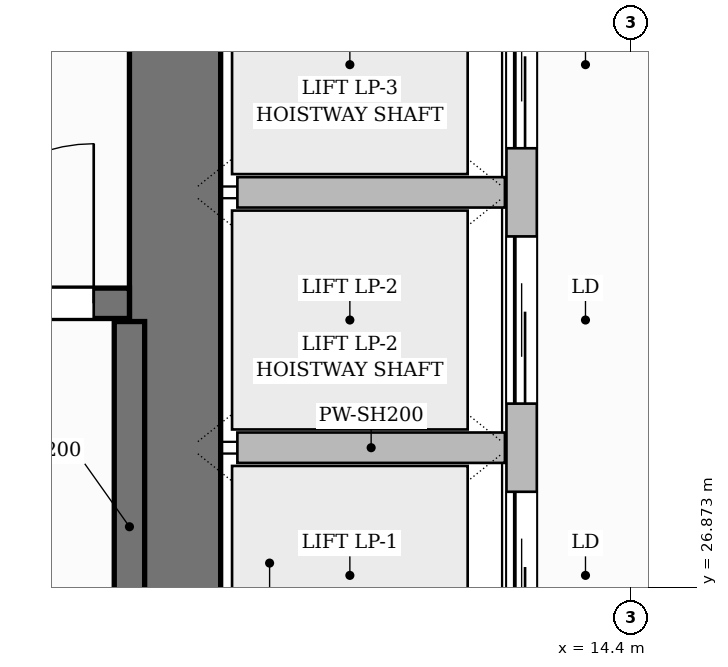
"""IFC4 building model, lengths in metres.
Left out: names, types, materials, properties, quantities, classifications, styles, units other than length and angle.
Written with IfcOpenShell. Run it as: python <this file> out.ifc"""

import sys

from ifc_helpers import new_model, si_unit, direction, frame, frame_2d, origin, place, context, subcontext, project, spatial, rectangle, extrude, source, transform, mapped, element, fill, save


model = new_model("IFC4")
c1 = context("Model", 3, precision=1e-05, world=origin(), true_north=direction((0.0, 1.0)))
c2 = subcontext(c1, "Body", "Model", "MODEL_VIEW")
j1 = project(units=[si_unit("LENGTHUNIT", "METRE"), si_unit("PLANEANGLEUNIT", "RADIAN")], contexts=[c1])
p1 = place(None, origin())
s1 = spatial("IfcSite", under=j1, at=p1, CompositionType="ELEMENT")
p2 = place(p1, origin())
s2 = spatial("IfcBuilding", under=s1, at=p2, CompositionType="ELEMENT")
p3 = place(p2, origin())
s3 = spatial("IfcBuildingStorey", under=s2, at=p3, CompositionType="ELEMENT", Elevation=0.0)
p4 = place(p3, frame((11.4, 25.5, 0.0), z_axis=(0.0, 0.0, 1.0), x_axis=(0.0, 1.0, 0.0)))
e1 = element("IfcWall", 1, at=p4, inside=s3, PredefinedType="SHEAR", context=c2, shape_type="SweptSolid", body=[
    extrude(rectangle(XDim=13.8, YDim=0.6, at=frame_2d((6.9, 0.0))), origin(), (0.0, 0.0, 1.0), 5.4),
])
p5 = place(p4, frame((6.47, 0.0, 0.0)))
e2 = element("IfcOpeningElement", 2, at=p5, cuts=e1, PredefinedType="OPENING", context=c2, shape_type="SweptSolid", body=[
    extrude(rectangle(XDim=1.5, YDim=2.2, at=frame_2d((0.75, 1.1))), frame((0.0, 0.31, 0.0), z_axis=(0.0, -1.0, 0.0), x_axis=(1.0, 0.0, 0.0)), (0.0, 0.0, 1.0), 0.62),
])
p6 = place(p3, frame((11.1, 25.92, 0.0), z_axis=(0.0, 0.0, 1.0), x_axis=(0.0, 1.0, 0.0)))
e3 = element("IfcWall", 3, at=p6, inside=s3, PredefinedType="SHEAR", context=c2, shape_type="SweptSolid", body=[
    extrude(rectangle(XDim=2.7, YDim=0.2, at=frame_2d((1.35, 0.0))), origin(), (0.0, 0.0, 1.0), 5.4),
])
p7 = place(p3, frame((4.0, 28.74, 0.0), z_axis=(0.0, 0.0, 1.0), x_axis=(1.0, 0.0, 0.0)))
e4 = element("IfcWall", 4, at=p7, inside=s3, PredefinedType="SHEAR", context=c2, shape_type="SweptSolid", body=[
    extrude(rectangle(XDim=7.1, YDim=0.2, at=frame_2d((3.55, 0.0))), origin(), (0.0, 0.0, 1.0), 5.4),
])
p8 = place(p7, frame((5.815, 0.0, 0.0)))
e5 = element("IfcOpeningElement", 5, at=p8, cuts=e4, PredefinedType="OPENING", context=c2, shape_type="SweptSolid", body=[
    extrude(rectangle(XDim=1.05, YDim=2.2, at=frame_2d((0.525, 1.1))), frame((0.0, 0.11, 0.0), z_axis=(0.0, -1.0, 0.0), x_axis=(1.0, 0.0, 0.0)), (0.0, 0.0, 1.0), 0.22),
])
p9 = place(p3, frame((13.68, 26.16, 0.0), z_axis=(0.0, 0.0, 1.0), x_axis=(0.0, 1.0, 0.0)))
e6 = element("IfcWall", 6, at=p9, inside=s3, PredefinedType="PARTITIONING", context=c2, shape_type="SweptSolid", body=[
    extrude(rectangle(XDim=4.94, YDim=0.2, at=frame_2d((2.47, 0.0))), origin(), (0.0, 0.0, 1.0), 5.1),
])
p10 = place(p9, frame((0.24, 0.0, 0.0)))
e7 = element("IfcOpeningElement", 7, at=p10, cuts=e6, PredefinedType="OPENING", context=c2, shape_type="SweptSolid", body=[
    extrude(rectangle(XDim=1.1, YDim=2.2, at=frame_2d((0.55, 1.1))), frame((0.0, 0.11, 0.0), z_axis=(0.0, -1.0, 0.0), x_axis=(1.0, 0.0, 0.0)), (0.0, 0.0, 1.0), 0.22),
])
p11 = place(p9, frame((1.92, 0.0, 0.0)))
e8 = element("IfcOpeningElement", 8, at=p11, cuts=e6, PredefinedType="OPENING", context=c2, shape_type="SweptSolid", body=[
    extrude(rectangle(XDim=1.1, YDim=2.2, at=frame_2d((0.55, 1.1))), frame((0.0, 0.11, 0.0), z_axis=(0.0, -1.0, 0.0), x_axis=(1.0, 0.0, 0.0)), (0.0, 0.0, 1.0), 0.22),
])
p12 = place(p9, frame((3.6, 0.0, 0.0)))
e9 = element("IfcOpeningElement", 9, at=p12, cuts=e6, PredefinedType="OPENING", context=c2, shape_type="SweptSolid", body=[
    extrude(rectangle(XDim=1.1, YDim=2.2, at=frame_2d((0.55, 1.1))), frame((0.0, 0.11, 0.0), z_axis=(0.0, -1.0, 0.0), x_axis=(1.0, 0.0, 0.0)), (0.0, 0.0, 1.0), 0.22),
])
for number, where, z_axis, x_axis in (
    (10, (11.81, 27.79, 0.0), (0.0, 0.0, 1.0), (1.0, 0.0, 0.0)),
    (11, (11.81, 29.47, 0.0), (0.0, 0.0, 1.0), (1.0, 0.0, 0.0)),
):
    element("IfcWall", number, at=place(p3, frame(where, z_axis=z_axis, x_axis=x_axis)), inside=s3, PredefinedType="PARTITIONING", context=c2, shape_type="SweptSolid", body=[
        extrude(rectangle(XDim=1.76, YDim=0.2, at=frame_2d((0.88, 0.0))), origin(), (0.0, 0.0, 1.0), 5.1),
    ])
m1 = source(origin(), c2, "Body", "SweptSolid", [
    extrude(rectangle(XDim=1.05, YDim=2.2, at=frame_2d((0.525, 1.1))), frame((0.0, 0.025, 0.0), z_axis=(0.0, -1.0, 0.0), x_axis=(1.0, 0.0, 0.0)), (0.0, 0.0, 1.0), 0.05),
])
p13 = place(p8, origin())
e12 = element("IfcDoor", 12, at=p13, inside=s3, OperationType="SINGLE_SWING_RIGHT", PredefinedType="DOOR", context=c2, shape_type="MappedRepresentation", body=[
    mapped(m1, transform((0.0, 0.0, 0.0), scale=1.0)),
])
fill(e5, e12)
m2 = source(origin(), c2, "Body", "SweptSolid", [
    extrude(rectangle(XDim=1.1, YDim=2.2, at=frame_2d((0.55, 1.1))), frame((0.0, 0.025, 0.0), z_axis=(0.0, -1.0, 0.0), x_axis=(1.0, 0.0, 0.0)), (0.0, 0.0, 1.0), 0.05),
])
p14 = place(p10, origin())
e13 = element("IfcDoor", 13, at=p14, inside=s3, OperationType="SLIDING_TO_LEFT", PredefinedType="DOOR", context=c2, shape_type="MappedRepresentation", body=[
    mapped(m2, transform((0.0, 0.0, 0.0), scale=1.0)),
])
fill(e7, e13)
p15 = place(p11, origin())
e14 = element("IfcDoor", 14, at=p15, inside=s3, OperationType="SLIDING_TO_LEFT", PredefinedType="DOOR", context=c2, shape_type="MappedRepresentation", body=[
    mapped(m2, transform((0.0, 0.0, 0.0), scale=1.0)),
])
fill(e8, e14)
p16 = place(p12, origin())
e15 = element("IfcDoor", 15, at=p16, inside=s3, OperationType="SLIDING_TO_LEFT", PredefinedType="DOOR", context=c2, shape_type="MappedRepresentation", body=[
    mapped(m2, transform((0.0, 0.0, 0.0), scale=1.0)),
])
fill(e9, e15)
save(model, sys.argv[1])
